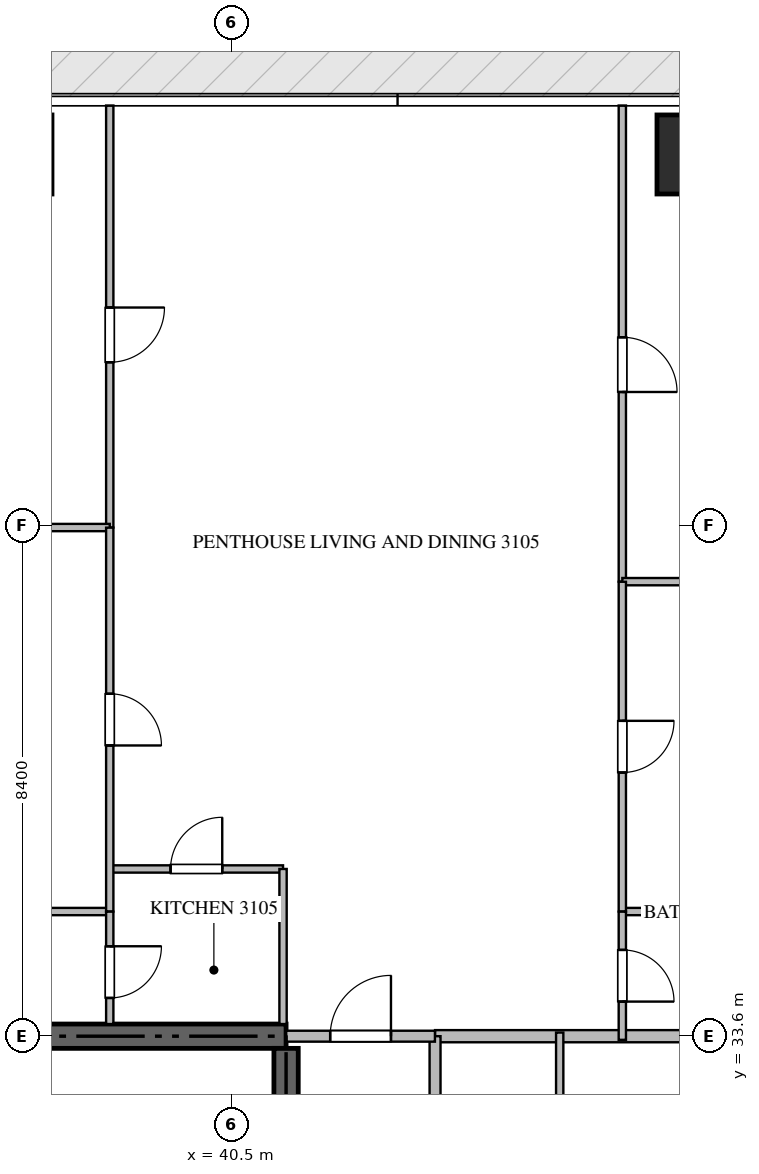
"""IFC4 building model, lengths in metres.
Left out: names, types, materials, properties, quantities, classifications, styles, units other than length and angle.
Written with IfcOpenShell. Run it as: python <this file> out.ifc"""

import sys

from ifc_helpers import new_model, si_unit, direction, frame, frame_2d, origin, origin_2d, place, context, subcontext, project, spatial, rectangle, extrude, source, transform, mapped, element, fill, save


model = new_model("IFC4")
c1 = context("Model", 3, precision=1e-05, world=origin(), true_north=direction((0.0, 1.0)))
c2 = subcontext(c1, "Body", "Model", "MODEL_VIEW")
j1 = project(units=[si_unit("LENGTHUNIT", "METRE"), si_unit("PLANEANGLEUNIT", "RADIAN")], contexts=[c1])
p1 = place(None, origin())
s1 = spatial("IfcSite", under=j1, at=p1, CompositionType="ELEMENT")
p2 = place(p1, origin())
s2 = spatial("IfcBuilding", under=s1, at=p2, CompositionType="ELEMENT")
p3 = place(p2, frame((0.0, 0.0, 127.65)))
s3 = spatial("IfcBuildingStorey", under=s2, at=p3, CompositionType="ELEMENT", Elevation=127.65)
p4 = place(p3, frame((41.4, 33.6, -0.26), z_axis=(0.0, 0.0, 1.0), x_axis=(-1.0, 0.0, 0.0)))
e1 = element("IfcWall", 1, at=p4, inside=s3, PredefinedType="SHEAR", context=c2, shape_type="SweptSolid", body=[
    extrude(rectangle(XDim=18.0, YDim=0.4, at=frame_2d((9.0, 0.0))), origin(), (0.0, 0.0, 1.0), 3.748),
])
p5 = place(p3, frame((41.4, 27.75, -0.26), z_axis=(0.0, 0.0, 1.0), x_axis=(0.0, 1.0, 0.0)))
e2 = element("IfcWall", 2, at=p5, inside=s3, PredefinedType="SHEAR", context=c2, shape_type="SweptSolid", body=[
    extrude(rectangle(XDim=5.65, YDim=0.4, at=frame_2d((2.825, 0.0))), origin(), (0.0, 0.0, 1.0), 3.748),
])
m1 = source(origin(), c2, "Body", "SweptSolid", [
    extrude(rectangle(XDim=1.3, YDim=1.3, at=origin_2d()), origin(), (0.0, 0.0, 1.0), 3.75),
])
p6 = place(p3, frame((48.15, 48.1, -0.26), z_axis=(0.0, 0.0, 1.0), x_axis=(1.0, 0.0, 0.0)))
e3 = element("IfcColumn", 3, at=p6, inside=s3, PredefinedType="COLUMN", context=c2, shape_type="MappedRepresentation", body=[
    mapped(m1, transform((0.0, 0.0, 0.0), scale=1.0)),
])
p7 = place(p3, frame((43.85, 33.6, 0.0), z_axis=(0.0, 0.0, 1.0), x_axis=(1.0, 0.0, 0.0)))
e4 = element("IfcWall", 4, at=p7, inside=s3, PredefinedType="PARTITIONING", context=c2, shape_type="SweptSolid", body=[
    extrude(rectangle(XDim=13.068, YDim=0.2, at=frame_2d((6.534, 0.0))), origin(), (0.0, 0.0, 1.0), 3.49),
])
p8 = place(p3, frame((43.85, 14.9, 0.0), z_axis=(0.0, 0.0, 1.0), x_axis=(0.0, 1.0, 0.0)))
e5 = element("IfcWall", 5, at=p8, inside=s3, PredefinedType="PARTITIONING", context=c2, shape_type="SweptSolid", body=[
    extrude(rectangle(XDim=18.7, YDim=0.18, at=frame_2d((9.35, 0.0))), origin(), (0.0, 0.0, 1.0), 3.49),
])
p9 = place(p8, frame((1.805, 0.0, 0.0)))
e6 = element("IfcOpeningElement", 6, at=p9, cuts=e5, PredefinedType="OPENING", context=c2, shape_type="SweptSolid", body=[
    extrude(rectangle(XDim=1.0, YDim=2.15, at=frame_2d((0.5, 1.075))), frame((0.0, 0.1, 0.0), z_axis=(0.0, -1.0, 0.0), x_axis=(1.0, 0.0, 0.0)), (0.0, 0.0, 1.0), 0.2),
])
p10 = place(p8, frame((10.602, 0.0, 0.0)))
e7 = element("IfcOpeningElement", 7, at=p10, cuts=e5, PredefinedType="OPENING", context=c2, shape_type="SweptSolid", body=[
    extrude(rectangle(XDim=1.0, YDim=2.15, at=frame_2d((0.5, 1.075))), frame((0.0, 0.1, 0.0), z_axis=(0.0, -1.0, 0.0), x_axis=(1.0, 0.0, 0.0)), (0.0, 0.0, 1.0), 0.2),
])
p11 = place(p3, frame((41.402, 33.6, 0.0), z_axis=(0.0, 0.0, 1.0), x_axis=(1.0, 0.0, 0.0)))
e8 = element("IfcWall", 8, at=p11, inside=s3, PredefinedType="PARTITIONING", context=c2, shape_type="SweptSolid", body=[
    extrude(rectangle(XDim=2.446, YDim=0.18, at=frame_2d((1.223, 0.0))), origin(), (0.0, 0.0, 1.0), 3.49),
])
p12 = place(p11, frame((0.723, 0.0, 0.0)))
e9 = element("IfcOpeningElement", 9, at=p12, cuts=e8, PredefinedType="OPENING", context=c2, shape_type="SweptSolid", body=[
    extrude(rectangle(XDim=1.0, YDim=2.15, at=frame_2d((0.5, 1.075))), frame((0.0, 0.1, 0.0), z_axis=(0.0, -1.0, 0.0), x_axis=(1.0, 0.0, 0.0)), (0.0, 0.0, 1.0), 0.2),
])
p13 = place(p3, frame((38.5, 36.35, 0.0), z_axis=(0.0, 0.0, 1.0), x_axis=(1.0, 0.0, 0.0)))
e10 = element("IfcWall", 10, at=p13, inside=s3, PredefinedType="PARTITIONING", context=c2, shape_type="SweptSolid", body=[
    extrude(rectangle(XDim=2.85, YDim=0.12, at=frame_2d((1.425, 0.0))), origin(), (0.0, 0.0, 1.0), 3.49),
])
p14 = place(p13, frame((1.0, 0.0, 0.0)))
e11 = element("IfcOpeningElement", 11, at=p14, cuts=e10, PredefinedType="OPENING", context=c2, shape_type="SweptSolid", body=[
    extrude(rectangle(XDim=0.85, YDim=2.1, at=frame_2d((0.425, 1.05))), frame((0.0, 0.07, 0.0), z_axis=(0.0, -1.0, 0.0), x_axis=(1.0, 0.0, 0.0)), (0.0, 0.0, 1.0), 0.14),
])
p15 = place(p3, frame((41.35, 36.35, 0.0), z_axis=(0.0, 0.0, 1.0), x_axis=(0.0, -1.0, 0.0)))
e12 = element("IfcWall", 12, at=p15, inside=s3, PredefinedType="PARTITIONING", context=c2, shape_type="SweptSolid", body=[
    extrude(rectangle(XDim=2.55, YDim=0.12, at=frame_2d((1.275, 0.0))), origin(), (0.0, 0.0, 1.0), 3.49),
])
p16 = place(p3, frame((38.5, 48.905, 0.0), z_axis=(0.0, 0.0, 1.0), x_axis=(0.0, -1.0, 0.0)))
e13 = element("IfcWall", 13, at=p16, inside=s3, PredefinedType="PARTITIONING", context=c2, shape_type="SweptSolid", body=[
    extrude(rectangle(XDim=6.94, YDim=0.12, at=frame_2d((3.47, 0.0))), origin(), (0.0, 0.0, 1.0), 3.49),
])
p17 = place(p16, frame((3.322, 0.0, 0.0)))
e14 = element("IfcOpeningElement", 14, at=p17, cuts=e13, PredefinedType="OPENING", context=c2, shape_type="SweptSolid", body=[
    extrude(rectangle(XDim=0.9, YDim=2.1, at=frame_2d((0.45, 1.05))), frame((0.0, 0.07, 0.0), z_axis=(0.0, -1.0, 0.0), x_axis=(1.0, 0.0, 0.0)), (0.0, 0.0, 1.0), 0.14),
])
p18 = place(p3, frame((32.34, 41.965, 0.0), z_axis=(0.0, 0.0, 1.0), x_axis=(1.0, 0.0, 0.0)))
e15 = element("IfcWall", 15, at=p18, inside=s3, PredefinedType="PARTITIONING", context=c2, shape_type="SweptSolid", body=[
    extrude(rectangle(XDim=6.16, YDim=0.12, at=frame_2d((3.08, 0.0))), origin(), (0.0, 0.0, 1.0), 3.49),
])
p19 = place(p3, frame((32.462, 35.65, 0.0), z_axis=(0.0, 0.0, 1.0), x_axis=(1.0, 0.0, 0.0)))
e16 = element("IfcWall", 16, at=p19, inside=s3, PredefinedType="PARTITIONING", context=c2, shape_type="SweptSolid", body=[
    extrude(rectangle(XDim=6.038, YDim=0.12, at=frame_2d((3.019, 0.0))), origin(), (0.0, 0.0, 1.0), 3.49),
])
p20 = place(p3, frame((38.5, 41.963, 0.0), z_axis=(0.0, 0.0, 1.0), x_axis=(0.0, -1.0, 0.0)))
e17 = element("IfcWall", 17, at=p20, inside=s3, PredefinedType="PARTITIONING", context=c2, shape_type="SweptSolid", body=[
    extrude(rectangle(XDim=6.313, YDim=0.12, at=frame_2d((3.156, 0.0))), origin(), (0.0, 0.0, 1.0), 3.49),
])
p21 = place(p20, frame((2.732, 0.0, 0.0)))
e18 = element("IfcOpeningElement", 18, at=p21, cuts=e17, PredefinedType="OPENING", context=c2, shape_type="SweptSolid", body=[
    extrude(rectangle(XDim=0.85, YDim=2.1, at=frame_2d((0.425, 1.05))), frame((0.0, 0.07, 0.0), z_axis=(0.0, -1.0, 0.0), x_axis=(1.0, 0.0, 0.0)), (0.0, 0.0, 1.0), 0.14),
])
p22 = place(p3, frame((38.5, 35.648, 0.0), z_axis=(0.0, 0.0, 1.0), x_axis=(0.0, -1.0, 0.0)))
e19 = element("IfcWall", 19, at=p22, inside=s3, PredefinedType="PARTITIONING", context=c2, shape_type="SweptSolid", body=[
    extrude(rectangle(XDim=1.848, YDim=0.12, at=frame_2d((0.924, 0.0))), origin(), (0.0, 0.0, 1.0), 3.49),
])
p23 = place(p22, frame((0.569, 0.0, 0.0)))
e20 = element("IfcOpeningElement", 20, at=p23, cuts=e19, PredefinedType="OPENING", context=c2, shape_type="SweptSolid", body=[
    extrude(rectangle(XDim=0.85, YDim=2.1, at=frame_2d((0.425, 1.05))), frame((0.0, 0.07, 0.0), z_axis=(0.0, -1.0, 0.0), x_axis=(1.0, 0.0, 0.0)), (0.0, 0.0, 1.0), 0.14),
])
p24 = place(p3, frame((46.93, 48.905, 0.0), z_axis=(0.0, 0.0, 1.0), x_axis=(0.0, -1.0, 0.0)))
e21 = element("IfcWall", 21, at=p24, inside=s3, PredefinedType="PARTITIONING", context=c2, shape_type="SweptSolid", body=[
    extrude(rectangle(XDim=7.83, YDim=0.12, at=frame_2d((3.915, 0.0))), origin(), (0.0, 0.0, 1.0), 3.49),
])
p25 = place(p24, frame((3.811, 0.0, 0.0)))
e22 = element("IfcOpeningElement", 22, at=p25, cuts=e21, PredefinedType="OPENING", context=c2, shape_type="SweptSolid", body=[
    extrude(rectangle(XDim=0.9, YDim=2.1, at=frame_2d((0.45, 1.05))), frame((0.0, 0.07, 0.0), z_axis=(0.0, -1.0, 0.0), x_axis=(1.0, 0.0, 0.0)), (0.0, 0.0, 1.0), 0.14),
])
p26 = place(p3, frame((46.93, 41.075, 0.0), z_axis=(0.0, 0.0, 1.0), x_axis=(1.0, 0.0, 0.0)))
e23 = element("IfcWall", 23, at=p26, inside=s3, PredefinedType="PARTITIONING", context=c2, shape_type="SweptSolid", body=[
    extrude(rectangle(XDim=5.975, YDim=0.12, at=frame_2d((2.988, 0.0))), origin(), (0.0, 0.0, 1.0), 3.49),
])
p27 = place(p3, frame((46.93, 35.65, 0.0), z_axis=(0.0, 0.0, 1.0), x_axis=(1.0, 0.0, 0.0)))
e24 = element("IfcWall", 24, at=p27, inside=s3, PredefinedType="PARTITIONING", context=c2, shape_type="SweptSolid", body=[
    extrude(rectangle(XDim=3.2, YDim=0.12, at=frame_2d((1.6, 0.0))), origin(), (0.0, 0.0, 1.0), 3.49),
])
p28 = place(p3, frame((46.93, 41.073, 0.0), z_axis=(0.0, 0.0, 1.0), x_axis=(0.0, -1.0, 0.0)))
e25 = element("IfcWall", 25, at=p28, inside=s3, PredefinedType="PARTITIONING", context=c2, shape_type="SweptSolid", body=[
    extrude(rectangle(XDim=5.423, YDim=0.12, at=frame_2d((2.711, 0.0))), origin(), (0.0, 0.0, 1.0), 3.49),
])
p29 = place(p28, frame((2.287, 0.0, 0.0)))
e26 = element("IfcOpeningElement", 26, at=p29, cuts=e25, PredefinedType="OPENING", context=c2, shape_type="SweptSolid", body=[
    extrude(rectangle(XDim=0.85, YDim=2.1, at=frame_2d((0.425, 1.05))), frame((0.0, 0.07, 0.0), z_axis=(0.0, -1.0, 0.0), x_axis=(1.0, 0.0, 0.0)), (0.0, 0.0, 1.0), 0.14),
])
p30 = place(p3, frame((46.93, 35.648, 0.0), z_axis=(0.0, 0.0, 1.0), x_axis=(0.0, -1.0, 0.0)))
e27 = element("IfcWall", 27, at=p30, inside=s3, PredefinedType="PARTITIONING", context=c2, shape_type="SweptSolid", body=[
    extrude(rectangle(XDim=2.108, YDim=0.12, at=frame_2d((1.054, 0.0))), origin(), (0.0, 0.0, 1.0), 3.49),
])
p31 = place(p30, frame((0.629, 0.0, 0.0)))
e28 = element("IfcOpeningElement", 28, at=p31, cuts=e27, PredefinedType="OPENING", context=c2, shape_type="SweptSolid", body=[
    extrude(rectangle(XDim=0.85, YDim=2.1, at=frame_2d((0.425, 1.05))), frame((0.0, 0.07, 0.0), z_axis=(0.0, -1.0, 0.0), x_axis=(1.0, 0.0, 0.0)), (0.0, 0.0, 1.0), 0.14),
])
p32 = place(p3, frame((45.9, 27.8, 0.0), z_axis=(0.0, 0.0, 1.0), x_axis=(0.0, 1.0, 0.0)))
e29 = element("IfcWall", 29, at=p32, inside=s3, PredefinedType="PARTITIONING", context=c2, shape_type="SweptSolid", body=[
    extrude(rectangle(XDim=5.86, YDim=0.12, at=frame_2d((2.93, 0.0))), origin(), (0.0, 0.0, 1.0), 3.49),
])
m2 = source(origin(), c2, "Body", "SweptSolid", [
    extrude(rectangle(XDim=1.0, YDim=2.15, at=frame_2d((0.5, 1.075))), frame((0.0, 0.025, 0.0), z_axis=(0.0, -1.0, 0.0), x_axis=(1.0, 0.0, 0.0)), (0.0, 0.0, 1.0), 0.05),
])
p33 = place(p12, origin())
e30 = element("IfcDoor", 30, at=p33, inside=s3, OperationType="SINGLE_SWING_RIGHT", PredefinedType="DOOR", context=c2, shape_type="MappedRepresentation", body=[
    mapped(m2, transform((0.0, 0.0, 0.0), scale=1.0)),
])
fill(e9, e30)
m3 = source(origin(), c2, "Body", "SweptSolid", [
    extrude(rectangle(XDim=0.85, YDim=2.1, at=frame_2d((0.425, 1.05))), frame((0.0, 0.025, 0.0), z_axis=(0.0, -1.0, 0.0), x_axis=(1.0, 0.0, 0.0)), (0.0, 0.0, 1.0), 0.05),
])
p34 = place(p14, origin())
e31 = element("IfcDoor", 31, at=p34, inside=s3, OperationType="SINGLE_SWING_RIGHT", PredefinedType="DOOR", context=c2, shape_type="MappedRepresentation", body=[
    mapped(m3, transform((0.0, 0.0, 0.0), scale=1.0)),
])
fill(e11, e31)
m4 = source(origin(), c2, "Body", "SweptSolid", [
    extrude(rectangle(XDim=0.9, YDim=2.1, at=frame_2d((0.45, 1.05))), frame((0.0, 0.025, 0.0), z_axis=(0.0, -1.0, 0.0), x_axis=(1.0, 0.0, 0.0)), (0.0, 0.0, 1.0), 0.05),
])
p35 = place(p17, origin())
e32 = element("IfcDoor", 32, at=p35, inside=s3, OperationType="SINGLE_SWING_LEFT", PredefinedType="DOOR", context=c2, shape_type="MappedRepresentation", body=[
    mapped(m4, transform((0.0, 0.0, 0.0), scale=1.0)),
])
fill(e14, e32)
p36 = place(p21, origin())
e33 = element("IfcDoor", 33, at=p36, inside=s3, OperationType="SINGLE_SWING_RIGHT", PredefinedType="DOOR", context=c2, shape_type="MappedRepresentation", body=[
    mapped(m3, transform((0.0, 0.0, 0.0), scale=1.0)),
])
fill(e18, e33)
p37 = place(p23, origin())
e34 = element("IfcDoor", 34, at=p37, inside=s3, OperationType="SINGLE_SWING_LEFT", PredefinedType="DOOR", context=c2, shape_type="MappedRepresentation", body=[
    mapped(m3, transform((0.0, 0.0, 0.0), scale=1.0)),
])
fill(e20, e34)
p38 = place(p25, origin())
e35 = element("IfcDoor", 35, at=p38, inside=s3, OperationType="SINGLE_SWING_RIGHT", PredefinedType="DOOR", context=c2, shape_type="MappedRepresentation", body=[
    mapped(m4, transform((0.0, 0.0, 0.0), scale=1.0)),
])
fill(e22, e35)
p39 = place(p29, origin())
e36 = element("IfcDoor", 36, at=p39, inside=s3, OperationType="SINGLE_SWING_LEFT", PredefinedType="DOOR", context=c2, shape_type="MappedRepresentation", body=[
    mapped(m3, transform((0.0, 0.0, 0.0), scale=1.0)),
])
fill(e26, e36)
p40 = place(p31, origin())
e37 = element("IfcDoor", 37, at=p40, inside=s3, OperationType="SINGLE_SWING_RIGHT", PredefinedType="DOOR", context=c2, shape_type="MappedRepresentation", body=[
    mapped(m3, transform((0.0, 0.0, 0.0), scale=1.0)),
])
fill(e28, e37)
save(model, sys.argv[1])
